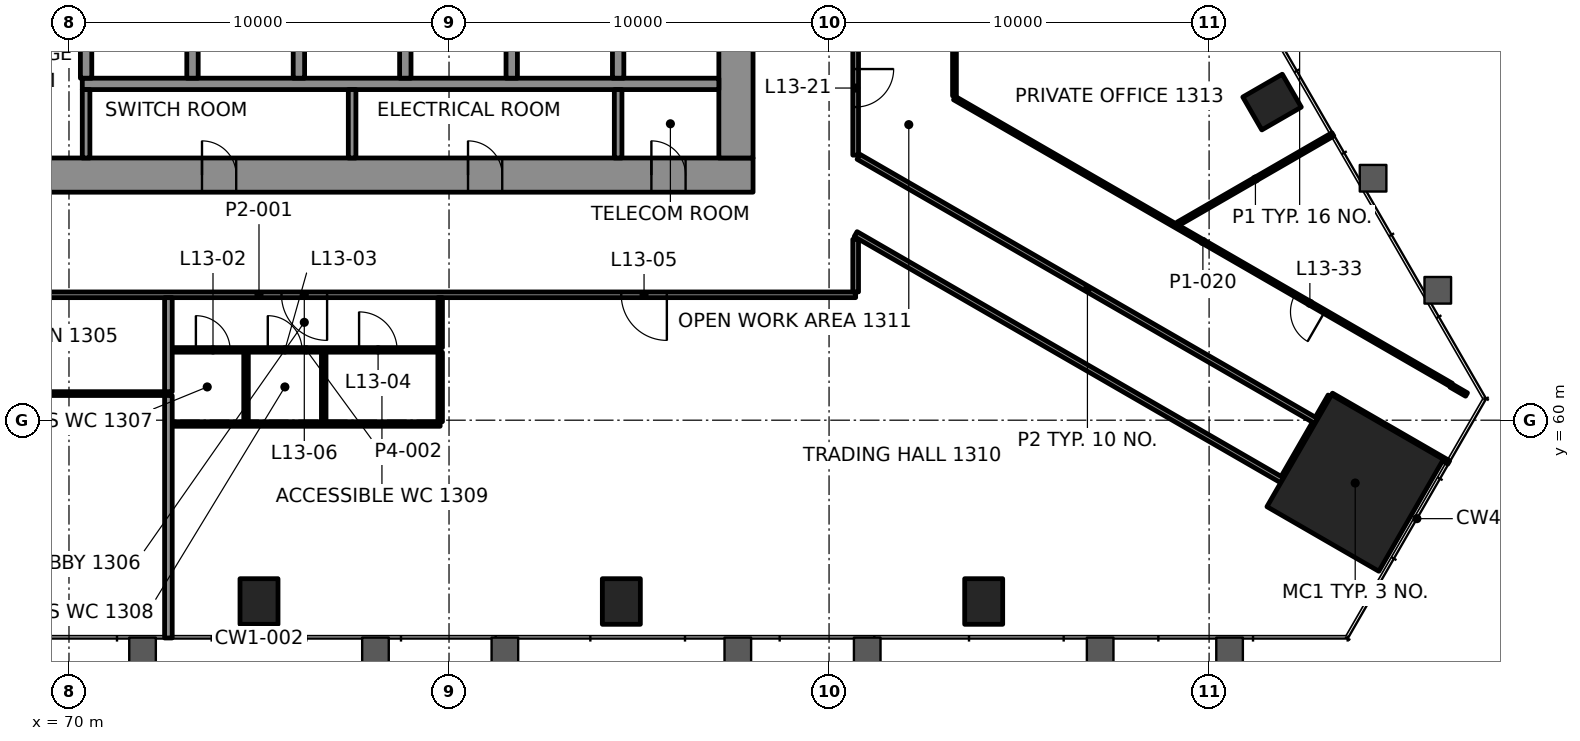
"""IFC4 building model, lengths in metres.
Left out: names, types, materials, properties, quantities, classifications, styles, units other than length and angle.
Written with IfcOpenShell. Run it as: python <this file> out.ifc"""

import sys

from ifc_helpers import new_model, si_unit, direction, frame, frame_2d, origin, origin_2d, place, context, subcontext, project, spatial, rectangle, extrude, element, fill, save


model = new_model("IFC4")
c1 = context("Model", 3, precision=1e-05, world=origin(), true_north=direction((0.0, 1.0)))
c2 = subcontext(c1, "Body", "Model", "MODEL_VIEW")
j1 = project(units=[si_unit("LENGTHUNIT", "METRE"), si_unit("PLANEANGLEUNIT", "RADIAN")], contexts=[c1])
p1 = place(None, origin())
s1 = spatial("IfcSite", under=j1, at=p1, CompositionType="ELEMENT")
p2 = place(p1, origin())
s2 = spatial("IfcBuilding", under=s1, at=p2, CompositionType="ELEMENT")
p3 = place(p2, frame((0.0, 0.0, 61.0)))
s3 = spatial("IfcBuildingStorey", under=s2, at=p3, CompositionType="ELEMENT", Elevation=61.0)
p4 = place(p3, frame((103.844, 58.347, 0.0), z_axis=(0.0, 0.0, 1.0), x_axis=(0.5, 0.866025403784, 0.0)))
e1 = element("IfcColumn", 1, at=p4, inside=s3, PredefinedType="COLUMN", context=c2, shape_type="SweptSolid", body=[
    extrude(rectangle(XDim=3.4, YDim=3.4, at=origin_2d()), origin(), (0.0, 0.0, 1.0), 4.2),
])
for number, where, z_axis, x_axis in (
    (2, (75.0, 55.229, -0.0), (0.0, 0.0, 1.0), (1.0, 0.0, 0.0)),
    (3, (84.534, 55.229, -0.0), (0.0, 0.0, 1.0), (1.0, 0.0, 0.0)),
    (4, (94.069, 55.229, -0.0), (0.0, 0.0, 1.0), (1.0, 0.0, 0.0)),
    (5, (101.657, 68.371, -0.0), (0.0, 0.0, 1.0), (-0.5, 0.866, 0.0)),
):
    element("IfcColumn", number, at=place(p3, frame(where, z_axis=z_axis, x_axis=x_axis)), inside=s3, PredefinedType="COLUMN", context=c2, shape_type="SweptSolid", body=[
        extrude(rectangle(XDim=1.0, YDim=1.2, at=origin_2d()), origin(), (0.0, 0.0, 1.0), 4.2),
    ])
p5 = place(p3, frame((62.0, 66.45, 0.0), z_axis=(0.0, 0.0, 1.0), x_axis=(1.0, 0.0, 0.0)))
e6 = element("IfcWall", 6, at=p5, inside=s3, PredefinedType="SHEAR", context=c2, shape_type="SweptSolid", body=[
    extrude(rectangle(XDim=26.0, YDim=0.9, at=frame_2d((13.0, 0.0))), origin(), (0.0, 0.0, 1.0), 4.0),
])
p6 = place(p5, frame((3.45, 0.0, 0.0)))
e7 = element("IfcOpeningElement", 7, at=p6, cuts=e6, PredefinedType="OPENING", context=c2, shape_type="SweptSolid", body=[
    extrude(rectangle(XDim=0.9, YDim=2.1, at=frame_2d((0.45, 1.05))), frame((0.0, 0.46, 0.0), z_axis=(0.0, -1.0, 0.0), x_axis=(1.0, 0.0, 0.0)), (0.0, 0.0, 1.0), 0.92),
])
p7 = place(p5, frame((6.425, 0.0, 0.0)))
e8 = element("IfcOpeningElement", 8, at=p7, cuts=e6, PredefinedType="OPENING", context=c2, shape_type="SweptSolid", body=[
    extrude(rectangle(XDim=0.9, YDim=2.1, at=frame_2d((0.45, 1.05))), frame((0.0, 0.46, 0.0), z_axis=(0.0, -1.0, 0.0), x_axis=(1.0, 0.0, 0.0)), (0.0, 0.0, 1.0), 0.92),
])
p8 = place(p5, frame((11.5, 0.0, 0.0)))
e9 = element("IfcOpeningElement", 9, at=p8, cuts=e6, PredefinedType="OPENING", context=c2, shape_type="SweptSolid", body=[
    extrude(rectangle(XDim=0.9, YDim=2.1, at=frame_2d((0.45, 1.05))), frame((0.0, 0.46, 0.0), z_axis=(0.0, -1.0, 0.0), x_axis=(1.0, 0.0, 0.0)), (0.0, 0.0, 1.0), 0.92),
])
p9 = place(p5, frame((18.5, 0.0, 0.0)))
e10 = element("IfcOpeningElement", 10, at=p9, cuts=e6, PredefinedType="OPENING", context=c2, shape_type="SweptSolid", body=[
    extrude(rectangle(XDim=0.9, YDim=2.1, at=frame_2d((0.45, 1.05))), frame((0.0, 0.46, 0.0), z_axis=(0.0, -1.0, 0.0), x_axis=(1.0, 0.0, 0.0)), (0.0, 0.0, 1.0), 0.92),
])
p10 = place(p5, frame((23.325, 0.0, 0.0)))
e11 = element("IfcOpeningElement", 11, at=p10, cuts=e6, PredefinedType="OPENING", context=c2, shape_type="SweptSolid", body=[
    extrude(rectangle(XDim=0.9, YDim=2.1, at=frame_2d((0.45, 1.05))), frame((0.0, 0.46, 0.0), z_axis=(0.0, -1.0, 0.0), x_axis=(1.0, 0.0, 0.0)), (0.0, 0.0, 1.0), 0.92),
])
p11 = place(p3, frame((87.55, 66.9, 0.0), z_axis=(0.0, 0.0, 1.0), x_axis=(0.0, 1.0, 0.0)))
e12 = element("IfcWall", 12, at=p11, inside=s3, PredefinedType="SHEAR", context=c2, shape_type="SweptSolid", body=[
    extrude(rectangle(XDim=16.2, YDim=0.9, at=frame_2d((8.1, 0.0))), origin(), (0.0, 0.0, 1.0), 4.0),
])
p12 = place(p11, frame((5.5, 0.0, 0.0)))
e13 = element("IfcOpeningElement", 13, at=p12, cuts=e12, PredefinedType="OPENING", context=c2, shape_type="SweptSolid", body=[
    extrude(rectangle(XDim=1.8, YDim=2.1, at=frame_2d((0.9, 1.05))), frame((0.0, 0.46, 0.0), z_axis=(0.0, -1.0, 0.0), x_axis=(1.0, 0.0, 0.0)), (0.0, 0.0, 1.0), 0.92),
])
p13 = place(p11, frame((12.272, 0.0, 0.0)))
e14 = element("IfcOpeningElement", 14, at=p13, cuts=e12, PredefinedType="OPENING", context=c2, shape_type="SweptSolid", body=[
    extrude(rectangle(XDim=0.9, YDim=2.1, at=frame_2d((0.45, 1.05))), frame((0.0, 0.46, 0.0), z_axis=(0.0, -1.0, 0.0), x_axis=(1.0, 0.0, 0.0)), (0.0, 0.0, 1.0), 0.92),
])
p14 = place(p3, frame((70.35, 68.85, 0.0), z_axis=(0.0, 0.0, 1.0), x_axis=(1.0, 0.0, 0.0)))
e15 = element("IfcWall", 15, at=p14, inside=s3, PredefinedType="SHEAR", context=c2, shape_type="SweptSolid", body=[
    extrude(rectangle(XDim=16.75, YDim=0.3, at=frame_2d((8.375, 0.0))), origin(), (0.0, 0.0, 1.0), 4.0),
])
for number, where, z_axis, x_axis in (
    (16, (70.45, 69.0, 0.0), (0.0, 0.0, 1.0), (0.0, 1.0, 0.0)),
    (17, (73.25, 69.0, 0.0), (0.0, 0.0, 1.0), (0.0, 1.0, 0.0)),
    (18, (76.05, 69.0, 0.0), (0.0, 0.0, 1.0), (0.0, 1.0, 0.0)),
    (19, (78.85, 69.0, 0.0), (0.0, 0.0, 1.0), (0.0, 1.0, 0.0)),
    (20, (81.65, 69.0, 0.0), (0.0, 0.0, 1.0), (0.0, 1.0, 0.0)),
    (21, (84.45, 69.0, 0.0), (0.0, 0.0, 1.0), (0.0, 1.0, 0.0)),
):
    element("IfcWall", number, at=place(p3, frame(where, z_axis=z_axis, x_axis=x_axis)), inside=s3, PredefinedType="SHEAR", context=c2, shape_type="SweptSolid", body=[
        extrude(rectangle(XDim=2.6, YDim=0.3, at=frame_2d((1.3, 0.0))), origin(), (0.0, 0.0, 1.0), 4.0),
    ])
p15 = place(p3, frame((72.717, 59.9, 0.0), z_axis=(0.0, 0.0, 1.0), x_axis=(1.0, 0.0, 0.0)))
e22 = element("IfcWall", 22, at=p15, inside=s3, PredefinedType="PARTITIONING", context=c2, shape_type="SweptSolid", body=[
    extrude(rectangle(XDim=7.05, YDim=0.12, at=frame_2d((3.525, 0.0))), origin(), (0.0, 0.0, 1.0), 3.4),
])
p16 = place(p3, frame((57.232, 60.7, 0.0), z_axis=(0.0, 0.0, 1.0), x_axis=(1.0, 0.0, 0.0)))
e23 = element("IfcWall", 23, at=p16, inside=s3, PredefinedType="PARTITIONING", context=c2, shape_type="SweptSolid", body=[
    extrude(rectangle(XDim=15.385, YDim=0.1, at=frame_2d((7.692, 0.0))), origin(), (0.0, 0.0, 1.0), 3.4),
])
p17 = place(p16, frame((7.192, 0.0, 0.0)))
e24 = element("IfcOpeningElement", 24, at=p17, cuts=e23, PredefinedType="OPENING", context=c2, shape_type="SweptSolid", body=[
    extrude(rectangle(XDim=1.0, YDim=2.1, at=frame_2d((0.5, 1.05))), frame((0.0, 0.06, 0.0), z_axis=(0.0, -1.0, 0.0), x_axis=(1.0, 0.0, 0.0)), (0.0, 0.0, 1.0), 0.12),
])
p18 = place(p3, frame((72.716, 61.85, 0.0), z_axis=(0.0, 0.0, 1.0), x_axis=(1.0, 0.0, 0.0)))
e25 = element("IfcWall", 25, at=p18, inside=s3, PredefinedType="PARTITIONING", context=c2, shape_type="SweptSolid", body=[
    extrude(rectangle(XDim=7.051, YDim=0.12, at=frame_2d((3.525, 0.0))), origin(), (0.0, 0.0, 1.0), 3.4),
])
p19 = place(p18, frame((0.623, 0.0, 0.0)))
e26 = element("IfcOpeningElement", 26, at=p19, cuts=e25, PredefinedType="OPENING", context=c2, shape_type="SweptSolid", body=[
    extrude(rectangle(XDim=0.9, YDim=2.1, at=frame_2d((0.45, 1.05))), frame((0.0, 0.07, 0.0), z_axis=(0.0, -1.0, 0.0), x_axis=(1.0, 0.0, 0.0)), (0.0, 0.0, 1.0), 0.14),
])
p20 = place(p18, frame((2.515, 0.0, 0.0)))
e27 = element("IfcOpeningElement", 27, at=p20, cuts=e25, PredefinedType="OPENING", context=c2, shape_type="SweptSolid", body=[
    extrude(rectangle(XDim=0.9, YDim=2.1, at=frame_2d((0.45, 1.05))), frame((0.0, 0.07, 0.0), z_axis=(0.0, -1.0, 0.0), x_axis=(1.0, 0.0, 0.0)), (0.0, 0.0, 1.0), 0.14),
])
p21 = place(p18, frame((4.917, 0.0, 0.0)))
e28 = element("IfcOpeningElement", 28, at=p21, cuts=e25, PredefinedType="OPENING", context=c2, shape_type="SweptSolid", body=[
    extrude(rectangle(XDim=1.0, YDim=2.1, at=frame_2d((0.5, 1.05))), frame((0.0, 0.07, 0.0), z_axis=(0.0, -1.0, 0.0), x_axis=(1.0, 0.0, 0.0)), (0.0, 0.0, 1.0), 0.14),
])
p22 = place(p3, frame((90.699, 63.3, 0.0), z_axis=(0.0, 0.0, 1.0), x_axis=(-1.0, 0.0, 0.0)))
e29 = element("IfcWall", 29, at=p22, inside=s3, PredefinedType="PARTITIONING", context=c2, shape_type="SweptSolid", body=[
    extrude(rectangle(XDim=31.399, YDim=0.15, at=frame_2d((15.7, 0.0))), origin(), (0.0, 0.0, 1.0), 3.4),
])
p23 = place(p22, frame((4.968, 0.0, 0.0)))
e30 = element("IfcOpeningElement", 30, at=p23, cuts=e29, PredefinedType="OPENING", context=c2, shape_type="SweptSolid", body=[
    extrude(rectangle(XDim=1.2, YDim=2.1, at=frame_2d((0.6, 1.05))), frame((0.0, 0.085, 0.0), z_axis=(0.0, -1.0, 0.0), x_axis=(1.0, 0.0, 0.0)), (0.0, 0.0, 1.0), 0.17),
])
p24 = place(p22, frame((13.908, 0.0, 0.0)))
e31 = element("IfcOpeningElement", 31, at=p24, cuts=e29, PredefinedType="OPENING", context=c2, shape_type="SweptSolid", body=[
    extrude(rectangle(XDim=1.2, YDim=2.1, at=frame_2d((0.6, 1.05))), frame((0.0, 0.085, 0.0), z_axis=(0.0, -1.0, 0.0), x_axis=(1.0, 0.0, 0.0)), (0.0, 0.0, 1.0), 0.17),
])
p25 = place(p22, frame((24.14, 0.0, 0.0)))
e32 = element("IfcOpeningElement", 32, at=p25, cuts=e29, PredefinedType="OPENING", context=c2, shape_type="SweptSolid", body=[
    extrude(rectangle(XDim=1.0, YDim=2.1, at=frame_2d((0.5, 1.05))), frame((0.0, 0.085, 0.0), z_axis=(0.0, -1.0, 0.0), x_axis=(1.0, 0.0, 0.0)), (0.0, 0.0, 1.0), 0.17),
])
p26 = place(p3, frame((99.182, 65.168, 0.0), z_axis=(0.0, 0.0, 1.0), x_axis=(0.866024864377, 0.50000093428, 0.0)))
e33 = element("IfcWall", 33, at=p26, inside=s3, PredefinedType="PARTITIONING", context=c2, shape_type="SweptSolid", body=[
    extrude(rectangle(XDim=4.705, YDim=0.1, at=frame_2d((2.353, 0.0))), origin(), (0.0, 0.0, 1.0), 3.4),
])
p27 = place(p3, frame((101.96, 58.482, 0.0), z_axis=(0.0, 0.0, 1.0), x_axis=(0.500102515474, 0.865966208357, 0.0)))
e34 = element("IfcWall", 34, at=p27, inside=s3, PredefinedType="PARTITIONING", context=c2, shape_type="SweptSolid", body=[
    extrude(rectangle(XDim=1.65, YDim=0.15, at=frame_2d((0.825, 0.0))), origin(), (0.0, 0.0, 1.0), 3.247),
])
p28 = place(p3, frame((93.3, 80.061, 0.0), z_axis=(0.0, 0.0, 1.0), x_axis=(0.0, -1.0, 0.0)))
e35 = element("IfcWall", 35, at=p28, inside=s3, PredefinedType="PARTITIONING", context=c2, shape_type="SweptSolid", body=[
    extrude(rectangle(XDim=11.527, YDim=0.1, at=frame_2d((5.764, 0.0))), origin(), (0.0, 0.0, 1.0), 3.4),
])
p29 = place(p28, frame((1.716, 0.0, 0.0)))
e36 = element("IfcOpeningElement", 36, at=p29, cuts=e35, PredefinedType="OPENING", context=c2, shape_type="SweptSolid", body=[
    extrude(rectangle(XDim=0.9, YDim=2.1, at=frame_2d((0.45, 1.05))), frame((0.0, 0.06, 0.0), z_axis=(0.0, -1.0, 0.0), x_axis=(1.0, 0.0, 0.0)), (0.0, 0.0, 1.0), 0.12),
])
p30 = place(p28, frame((5.741, 0.0, 0.0)))
e37 = element("IfcOpeningElement", 37, at=p30, cuts=e35, PredefinedType="OPENING", context=c2, shape_type="SweptSolid", body=[
    extrude(rectangle(XDim=0.9, YDim=2.1, at=frame_2d((0.45, 1.05))), frame((0.0, 0.06, 0.0), z_axis=(0.0, -1.0, 0.0), x_axis=(1.0, 0.0, 0.0)), (0.0, 0.0, 1.0), 0.12),
])
p31 = place(p28, frame((9.342, 0.0, 0.0)))
e38 = element("IfcOpeningElement", 38, at=p31, cuts=e35, PredefinedType="OPENING", context=c2, shape_type="SweptSolid", body=[
    extrude(rectangle(XDim=0.9, YDim=2.1, at=frame_2d((0.45, 1.05))), frame((0.0, 0.06, 0.0), z_axis=(0.0, -1.0, 0.0), x_axis=(1.0, 0.0, 0.0)), (0.0, 0.0, 1.0), 0.12),
])
p32 = place(p3, frame((90.7, 63.375, 0.0), z_axis=(0.0, 0.0, 1.0), x_axis=(0.0, 1.0, 0.0)))
e39 = element("IfcWall", 39, at=p32, inside=s3, PredefinedType="PARTITIONING", context=c2, shape_type="SweptSolid", body=[
    extrude(rectangle(XDim=1.384, YDim=0.15, at=frame_2d((0.692, 0.0))), origin(), (0.0, 0.0, 1.0), 3.247),
])
p33 = place(p3, frame((90.7, 86.699, 0.0), z_axis=(0.0, 0.0, 1.0), x_axis=(0.0, -1.0, 0.0)))
e40 = element("IfcWall", 40, at=p33, inside=s3, PredefinedType="PARTITIONING", context=c2, shape_type="SweptSolid", body=[
    extrude(rectangle(XDim=19.725, YDim=0.15, at=frame_2d((9.862, 0.0))), origin(), (0.0, 0.0, 1.0), 3.4),
])
p34 = place(p33, frame((11.768, 0.0, 0.0)))
e41 = element("IfcOpeningElement", 41, at=p34, cuts=e40, PredefinedType="OPENING", context=c2, shape_type="SweptSolid", body=[
    extrude(rectangle(XDim=1.0, YDim=2.1, at=frame_2d((0.5, 1.05))), frame((0.0, 0.085, 0.0), z_axis=(0.0, -1.0, 0.0), x_axis=(1.0, 0.0, 0.0)), (0.0, 0.0, 1.0), 0.17),
])
p35 = place(p33, frame((17.459, 0.0, 0.0)))
e42 = element("IfcOpeningElement", 42, at=p35, cuts=e40, PredefinedType="OPENING", context=c2, shape_type="SweptSolid", body=[
    extrude(rectangle(XDim=1.0, YDim=2.1, at=frame_2d((0.5, 1.05))), frame((0.0, 0.085, 0.0), z_axis=(0.0, -1.0, 0.0), x_axis=(1.0, 0.0, 0.0)), (0.0, 0.0, 1.0), 0.17),
])
p36 = place(p3, frame((79.767, 59.96, 0.0), z_axis=(0.0, 0.0, 1.0), x_axis=(0.0, 1.0, 0.0)))
e43 = element("IfcWall", 43, at=p36, inside=s3, PredefinedType="PARTITIONING", context=c2, shape_type="SweptSolid", body=[
    extrude(rectangle(XDim=1.83, YDim=0.12, at=frame_2d((0.915, 0.0))), origin(), (0.0, 0.0, 1.0), 3.4),
])
for number, where, z_axis, x_axis in (
    (44, (76.703, 59.96, 0.0), (0.0, 0.0, 1.0), (0.0, 1.0, 0.0)),
    (45, (74.659, 59.96, 0.0), (0.0, 0.0, 1.0), (0.0, 1.0, 0.0)),
):
    element("IfcWall", number, at=place(p3, frame(where, z_axis=z_axis, x_axis=x_axis)), inside=s3, PredefinedType="PARTITIONING", context=c2, shape_type="SweptSolid", body=[
        extrude(rectangle(XDim=1.83, YDim=0.12, at=frame_2d((0.915, 0.0))), origin(), (0.0, 0.0, 1.0), 3.4),
    ])
p37 = place(p3, frame((72.616, 54.269, 0.0), z_axis=(0.0, 0.0, 1.0), x_axis=(0.0, 1.0, 0.0)))
e46 = element("IfcWall", 46, at=p37, inside=s3, PredefinedType="PARTITIONING", context=c2, shape_type="SweptSolid", body=[
    extrude(rectangle(XDim=6.381, YDim=0.2, at=frame_2d((3.19, 0.0))), origin(), (0.0, 0.0, 1.0), 3.165),
])
p38 = place(p3, frame((106.374, 60.928, 0.0), z_axis=(0.0, 0.0, 1.0), x_axis=(-0.866022109353, 0.50000570608, 0.0)))
e47 = element("IfcWall", 47, at=p38, inside=s3, PredefinedType="PARTITIONING", context=c2, shape_type="SweptSolid", body=[
    extrude(rectangle(XDim=15.096, YDim=0.1, at=frame_2d((7.548, 0.0))), origin(), (0.0, 0.0, 1.0), 3.4),
])
p39 = place(p38, frame((3.847, 0.0, 0.0)))
e48 = element("IfcOpeningElement", 48, at=p39, cuts=e47, PredefinedType="OPENING", context=c2, shape_type="SweptSolid", body=[
    extrude(rectangle(XDim=0.9, YDim=2.1, at=frame_2d((0.45, 1.05))), frame((0.0, 0.06, 0.0), z_axis=(0.0, -1.0, 0.0), x_axis=(1.0, 0.0, 0.0)), (0.0, 0.0, 1.0), 0.12),
])
p40 = place(p3, frame((106.774, 60.675, 0.0), z_axis=(0.0, 0.0, 1.0), x_axis=(-0.865979310119, 0.500079828073, 0.0)))
e49 = element("IfcWall", 49, at=p40, inside=s3, PredefinedType="PARTITIONING", context=c2, shape_type="SweptSolid", body=[
    extrude(rectangle(XDim=0.473, YDim=0.1, at=frame_2d((0.237, 0.0))), origin(), (0.0, 0.0, 1.0), 3.4),
])
p41 = place(p3, frame((106.305, 58.888, 0.0), z_axis=(0.0, 0.0, 1.0), x_axis=(-0.866061095881, 0.499938174379, 0.0)))
e50 = element("IfcWall", 50, at=p41, inside=s3, PredefinedType="PARTITIONING", context=c2, shape_type="SweptSolid", body=[
    extrude(rectangle(XDim=3.56, YDim=0.1, at=frame_2d((1.78, 0.0))), origin(), (0.0, 0.0, 1.0), 3.4),
])
p42 = place(p3, frame((102.822, 59.976, 0.0), z_axis=(0.0, 0.0, 1.0), x_axis=(-0.866019280802, 0.500010605167, 0.0)))
e51 = element("IfcWall", 51, at=p42, inside=s3, PredefinedType="PARTITIONING", context=c2, shape_type="SweptSolid", body=[
    extrude(rectangle(XDim=13.91, YDim=0.15, at=frame_2d((6.955, 0.0))), origin(), (0.0, 0.0, 1.0), 3.4),
])
p43 = place(p3, frame((101.922, 58.417, 0.0), z_axis=(0.0, 0.0, 1.0), x_axis=(-0.866024629744, 0.500001340675, 0.0)))
e52 = element("IfcWall", 52, at=p43, inside=s3, PredefinedType="PARTITIONING", context=c2, shape_type="SweptSolid", body=[
    extrude(rectangle(XDim=12.958, YDim=0.15, at=frame_2d((6.479, 0.0))), origin(), (0.0, 0.0, 1.0), 3.247),
])
p44 = place(p3, frame((72.616, 60.75, 0.0), z_axis=(0.0, 0.0, 1.0), x_axis=(0.0, 1.0, 0.0)))
e53 = element("IfcWall", 53, at=p44, inside=s3, PredefinedType="PARTITIONING", context=c2, shape_type="SweptSolid", body=[
    extrude(rectangle(XDim=2.475, YDim=0.2, at=frame_2d((1.238, 0.0))), origin(), (0.0, 0.0, 1.0), 3.4),
])
p45 = place(p3, frame((79.767, 61.91, 0.0), z_axis=(0.0, 0.0, 1.0), x_axis=(0.0, 1.0, 0.0)))
e54 = element("IfcWall", 54, at=p45, inside=s3, PredefinedType="PARTITIONING", context=c2, shape_type="SweptSolid", body=[
    extrude(rectangle(XDim=1.315, YDim=0.12, at=frame_2d((0.657, 0.0))), origin(), (0.0, 0.0, 1.0), 3.4),
])
p46 = place(p3, frame((102.86, 60.041, 0.0), z_axis=(0.0, 0.0, 1.0), x_axis=(0.500036104519, 0.866004557827, 0.0)))
e55 = element("IfcWall", 55, at=p46, inside=s3, PredefinedType="PARTITIONING", context=c2, shape_type="SweptSolid", body=[
    extrude(rectangle(XDim=0.674, YDim=0.15, at=frame_2d((0.337, 0.0))), origin(), (0.0, 0.0, 1.0), 3.4),
])
for number, where, z_axis, x_axis in (
    (56, (70.45, 66.9, 0.0), (0.0, 0.0, 1.0), (0.0, 1.0, 0.0)),
    (57, (77.45, 66.9, 0.0), (0.0, 0.0, 1.0), (0.0, 1.0, 0.0)),
    (58, (84.45, 66.9, 0.0), (0.0, 0.0, 1.0), (0.0, 1.0, 0.0)),
):
    element("IfcWall", number, at=place(p3, frame(where, z_axis=z_axis, x_axis=x_axis)), inside=s3, PredefinedType="PARTITIONING", context=c2, shape_type="SweptSolid", body=[
        extrude(rectangle(XDim=1.8, YDim=0.2, at=frame_2d((0.9, 0.0))), origin(), (0.0, 0.0, 1.0), 4.0),
    ])
p47 = place(p19, origin())
e59 = element("IfcDoor", 59, at=p47, inside=s3, OperationType="SINGLE_SWING_RIGHT", PredefinedType="DOOR", context=c2, shape_type="SweptSolid", body=[
    extrude(rectangle(XDim=0.9, YDim=2.1, at=frame_2d((0.45, 1.05))), frame((0.0, 0.025, 0.0), z_axis=(0.0, -1.0, 0.0), x_axis=(1.0, 0.0, 0.0)), (0.0, 0.0, 1.0), 0.05),
])
fill(e26, e59)
p48 = place(p20, origin())
e60 = element("IfcDoor", 60, at=p48, inside=s3, OperationType="SINGLE_SWING_LEFT", PredefinedType="DOOR", context=c2, shape_type="SweptSolid", body=[
    extrude(rectangle(XDim=0.9, YDim=2.1, at=frame_2d((0.45, 1.05))), frame((0.0, 0.025, 0.0), z_axis=(0.0, -1.0, 0.0), x_axis=(1.0, 0.0, 0.0)), (0.0, 0.0, 1.0), 0.05),
])
fill(e27, e60)
p49 = place(p21, origin())
e61 = element("IfcDoor", 61, at=p49, inside=s3, OperationType="SINGLE_SWING_RIGHT", PredefinedType="DOOR", context=c2, shape_type="SweptSolid", body=[
    extrude(rectangle(XDim=1.0, YDim=2.1, at=frame_2d((0.5, 1.05))), frame((0.0, 0.025, 0.0), z_axis=(0.0, -1.0, 0.0), x_axis=(1.0, 0.0, 0.0)), (0.0, 0.0, 1.0), 0.05),
])
fill(e28, e61)
p50 = place(p23, origin())
e62 = element("IfcDoor", 62, at=p50, inside=s3, OperationType="DOUBLE_DOOR_SINGLE_SWING", PredefinedType="DOOR", context=c2, shape_type="SweptSolid", body=[
    extrude(rectangle(XDim=1.2, YDim=2.1, at=frame_2d((0.6, 1.05))), frame((0.0, 0.025, 0.0), z_axis=(0.0, -1.0, 0.0), x_axis=(1.0, 0.0, 0.0)), (0.0, 0.0, 1.0), 0.05),
])
fill(e30, e62)
p51 = place(p24, origin())
e63 = element("IfcDoor", 63, at=p51, inside=s3, OperationType="DOUBLE_DOOR_SINGLE_SWING", PredefinedType="DOOR", context=c2, shape_type="SweptSolid", body=[
    extrude(rectangle(XDim=1.2, YDim=2.1, at=frame_2d((0.6, 1.05))), frame((0.0, 0.025, 0.0), z_axis=(0.0, -1.0, 0.0), x_axis=(1.0, 0.0, 0.0)), (0.0, 0.0, 1.0), 0.05),
])
fill(e31, e63)
p52 = place(p35, origin())
e64 = element("IfcDoor", 64, at=p52, inside=s3, OperationType="SINGLE_SWING_LEFT", PredefinedType="DOOR", context=c2, shape_type="SweptSolid", body=[
    extrude(rectangle(XDim=1.0, YDim=2.1, at=frame_2d((0.5, 1.05))), frame((0.0, 0.025, 0.0), z_axis=(0.0, -1.0, 0.0), x_axis=(1.0, 0.0, 0.0)), (0.0, 0.0, 1.0), 0.05),
])
fill(e42, e64)
p53 = place(p39, origin())
e65 = element("IfcDoor", 65, at=p53, inside=s3, OperationType="SINGLE_SWING_LEFT", PredefinedType="DOOR", context=c2, shape_type="SweptSolid", body=[
    extrude(rectangle(XDim=0.9, YDim=2.1, at=frame_2d((0.45, 1.05))), frame((0.0, 0.025, 0.0), z_axis=(0.0, -1.0, 0.0), x_axis=(1.0, 0.0, 0.0)), (0.0, 0.0, 1.0), 0.05),
])
fill(e48, e65)
p54 = place(p8, origin())
e66 = element("IfcDoor", 66, at=p54, inside=s3, OperationType="SINGLE_SWING_LEFT", PredefinedType="DOOR", context=c2, shape_type="SweptSolid", body=[
    extrude(rectangle(XDim=0.9, YDim=2.1, at=frame_2d((0.45, 1.05))), frame((0.0, 0.17, 0.0), z_axis=(0.0, -1.0, 0.0), x_axis=(1.0, 0.0, 0.0)), (0.0, 0.0, 1.0), 0.34),
])
fill(e9, e66)
p55 = place(p9, origin())
e67 = element("IfcDoor", 67, at=p55, inside=s3, OperationType="SINGLE_SWING_RIGHT", PredefinedType="DOOR", context=c2, shape_type="SweptSolid", body=[
    extrude(rectangle(XDim=0.9, YDim=2.1, at=frame_2d((0.45, 1.05))), frame((0.0, 0.17, 0.0), z_axis=(0.0, -1.0, 0.0), x_axis=(1.0, 0.0, 0.0)), (0.0, 0.0, 1.0), 0.34),
])
fill(e10, e67)
p56 = place(p10, origin())
e68 = element("IfcDoor", 68, at=p56, inside=s3, OperationType="SINGLE_SWING_LEFT", PredefinedType="DOOR", context=c2, shape_type="SweptSolid", body=[
    extrude(rectangle(XDim=0.9, YDim=2.1, at=frame_2d((0.45, 1.05))), frame((0.0, 0.17, 0.0), z_axis=(0.0, -1.0, 0.0), x_axis=(1.0, 0.0, 0.0)), (0.0, 0.0, 1.0), 0.34),
])
fill(e11, e68)
save(model, sys.argv[1])
